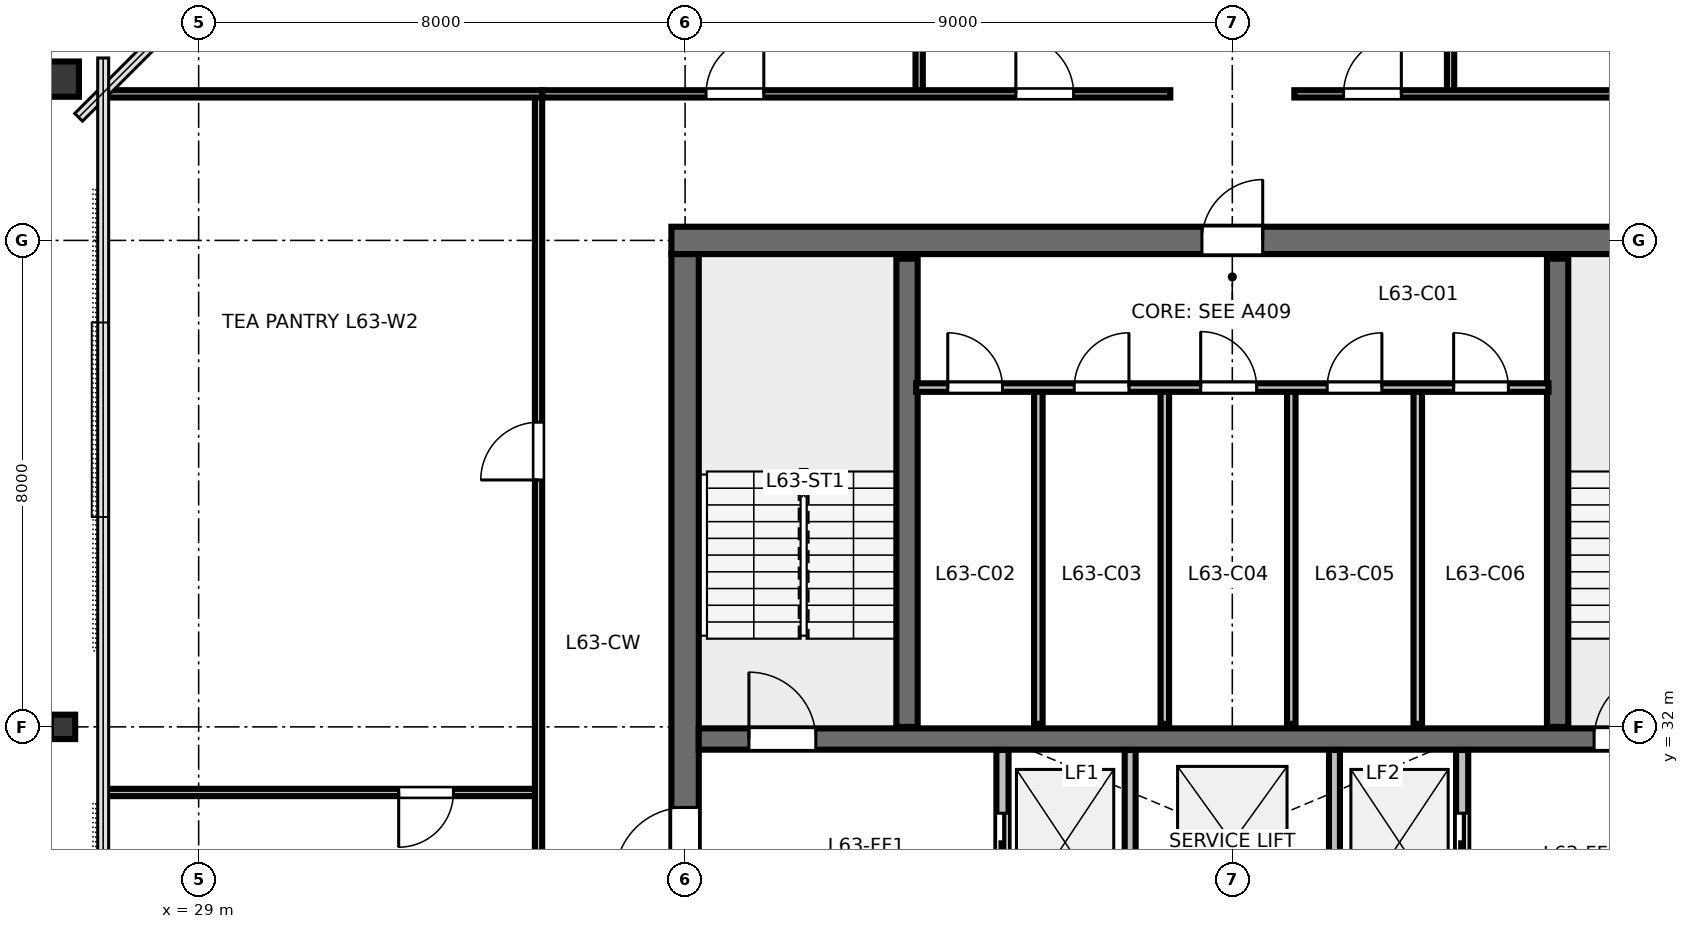
"""IFC4 building model, lengths in metres.
Left out: names, types, materials, properties, quantities, classifications, styles, units other than length and angle.
Written with IfcOpenShell. Run it as: python <this file> out.ifc"""

import sys

from ifc_helpers import new_model, si_unit, direction, frame, frame_2d, origin, origin_2d, place, context, subcontext, project, spatial, rectangle, hollow_rectangle, i_section, extrude, element, fill, save


model = new_model("IFC4")
c1 = context("Model", 3, precision=1e-05, world=origin(), true_north=direction((0.0, 1.0)))
c2 = subcontext(c1, "Body", "Model", "MODEL_VIEW")
j1 = project(units=[si_unit("LENGTHUNIT", "METRE"), si_unit("PLANEANGLEUNIT", "RADIAN")], contexts=[c1])
p1 = place(None, origin())
s1 = spatial("IfcSite", under=j1, at=p1, CompositionType="ELEMENT")
p2 = place(p1, origin())
s2 = spatial("IfcBuilding", under=s1, at=p2, CompositionType="ELEMENT")
p3 = place(p2, frame((0.0, 0.0, 239.4)))
s3 = spatial("IfcBuildingStorey", under=s2, at=p3, CompositionType="ELEMENT", Elevation=239.4)
p4 = place(p3, frame((36.775, 40.0, 0.0), z_axis=(0.0, 0.0, 1.0), x_axis=(1.0, 0.0, 0.0)))
e1 = element("IfcWall", 1, at=p4, inside=s3, PredefinedType="SHEAR", context=c2, shape_type="SweptSolid", body=[
    extrude(rectangle(XDim=18.45, YDim=0.45, at=frame_2d((9.225, 0.0))), origin(), (0.0, 0.0, 1.0), 3.36),
])
p5 = place(p4, frame((8.725, 0.0, 0.0)))
e2 = element("IfcOpeningElement", 2, at=p5, cuts=e1, PredefinedType="OPENING", context=c2, shape_type="SweptSolid", body=[
    extrude(rectangle(XDim=1.0, YDim=2.15, at=frame_2d((0.5, 1.075))), frame((0.0, 0.235, 0.0), z_axis=(0.0, -1.0, 0.0), x_axis=(1.0, 0.0, 0.0)), (0.0, 0.0, 1.0), 0.47),
])
p6 = place(p3, frame((37.0, 24.225, 0.0), z_axis=(0.0, 0.0, 1.0), x_axis=(0.0, 1.0, 0.0)))
e3 = element("IfcWall", 3, at=p6, inside=s3, PredefinedType="SHEAR", context=c2, shape_type="SweptSolid", body=[
    extrude(rectangle(XDim=15.55, YDim=0.45, at=frame_2d((7.775, 0.0))), origin(), (0.0, 0.0, 1.0), 3.36),
])
p7 = place(p6, frame((5.3, 0.0, 0.0)))
e4 = element("IfcOpeningElement", 4, at=p7, cuts=e3, PredefinedType="OPENING", context=c2, shape_type="SweptSolid", body=[
    extrude(rectangle(XDim=1.15, YDim=2.15, at=frame_2d((0.575, 1.075))), frame((0.0, 0.235, 0.0), z_axis=(0.0, -1.0, 0.0), x_axis=(1.0, 0.0, 0.0)), (0.0, 0.0, 1.0), 0.47),
])
p8 = place(p3, frame((37.225, 31.8, 0.0), z_axis=(0.0, 0.0, 1.0), x_axis=(1.0, 0.0, 0.0)))
e5 = element("IfcWall", 5, at=p8, inside=s3, PredefinedType="SHEAR", context=c2, shape_type="SweptSolid", body=[
    extrude(rectangle(XDim=17.55, YDim=0.35, at=frame_2d((8.775, 0.0))), origin(), (0.0, 0.0, 1.0), 3.36),
])
p9 = place(p8, frame((0.825, 0.0, 0.0)))
e6 = element("IfcOpeningElement", 6, at=p9, cuts=e5, PredefinedType="OPENING", context=c2, shape_type="SweptSolid", body=[
    extrude(rectangle(XDim=1.1, YDim=2.15, at=frame_2d((0.55, 1.075))), frame((0.0, 0.185, 0.0), z_axis=(0.0, -1.0, 0.0), x_axis=(1.0, 0.0, 0.0)), (0.0, 0.0, 1.0), 0.37),
])
p10 = place(p8, frame((14.725, 0.0, 0.0)))
e7 = element("IfcOpeningElement", 7, at=p10, cuts=e5, PredefinedType="OPENING", context=c2, shape_type="SweptSolid", body=[
    extrude(rectangle(XDim=1.1, YDim=2.15, at=frame_2d((0.55, 1.075))), frame((0.0, 0.185, 0.0), z_axis=(0.0, -1.0, 0.0), x_axis=(1.0, 0.0, 0.0)), (0.0, 0.0, 1.0), 0.37),
])
p11 = place(p3, frame((26.68, 42.652, 0.0), z_axis=(0.0, 0.0, 1.0), x_axis=(0.0, 1.0, 0.0)))
e8 = element("IfcColumn", 8, at=p11, inside=s3, PredefinedType="COLUMN", context=c2, shape_type="SweptSolid", body=[
    extrude(hollow_rectangle(XDim=0.58, YDim=0.7, WallThickness=0.032, at=origin_2d()), origin(), (0.0, 0.0, 1.0), 3.373),
])
p12 = place(p3, frame((26.77, 32.0, 0.0), z_axis=(0.0, 0.0, 1.0), x_axis=(0.0, 1.0, 0.0)))
e9 = element("IfcColumn", 9, at=p12, inside=s3, PredefinedType="COLUMN", context=c2, shape_type="SweptSolid", body=[
    extrude(i_section(OverallWidth=0.401, OverallDepth=0.399, WebThickness=0.025, FlangeThickness=0.04, FilletRadius=0.025, at=origin_2d()), origin(), (0.0, 0.0, 1.0), 3.373),
])
for number, where, z_axis, x_axis in (
    (10, (40.65, 32.0, 0.0), (0.0, 0.0, 1.0), (0.0, 1.0, 0.0)),
    (11, (51.35, 32.0, 0.0), (0.0, 0.0, 1.0), (0.0, 1.0, 0.0)),
):
    element("IfcWall", number, at=place(p3, frame(where, z_axis=z_axis, x_axis=x_axis)), inside=s3, PredefinedType="SHEAR", context=c2, shape_type="SweptSolid", body=[
        extrude(rectangle(XDim=7.7, YDim=0.35, at=frame_2d((3.85, 0.0))), origin(), (0.0, 0.0, 1.0), 3.6),
    ])
for number, where, z_axis, x_axis in (
    (12, (42.81, 32.05, 0.0), (0.0, 0.0, 1.0), (0.0, 1.0, 0.0)),
    (13, (44.89, 32.05, 0.0), (0.0, 0.0, 1.0), (0.0, 1.0, 0.0)),
    (14, (46.97, 32.05, 0.0), (0.0, 0.0, 1.0), (0.0, 1.0, 0.0)),
    (15, (49.05, 32.05, 0.0), (0.0, 0.0, 1.0), (0.0, 1.0, 0.0)),
):
    element("IfcWall", number, at=place(p3, frame(where, z_axis=z_axis, x_axis=x_axis)), inside=s3, PredefinedType="PARTITIONING", context=c2, shape_type="SweptSolid", body=[
        extrude(rectangle(XDim=5.5, YDim=0.14, at=frame_2d((2.75, 0.0))), origin(), (0.0, 0.0, 1.0), 3.375),
    ])
p13 = place(p3, frame((40.8, 37.58, 0.0), z_axis=(0.0, 0.0, 1.0), x_axis=(1.0, 0.0, 0.0)))
e16 = element("IfcWall", 16, at=p13, inside=s3, PredefinedType="PARTITIONING", context=c2, shape_type="SweptSolid", body=[
    extrude(rectangle(XDim=10.4, YDim=0.14, at=frame_2d((5.2, 0.0))), origin(), (0.0, 0.0, 1.0), 3.375),
])
p14 = place(p13, frame((0.52, 0.0, 0.0)))
e17 = element("IfcOpeningElement", 17, at=p14, cuts=e16, PredefinedType="OPENING", context=c2, shape_type="SweptSolid", body=[
    extrude(rectangle(XDim=0.9, YDim=2.15, at=frame_2d((0.45, 1.075))), frame((0.0, 0.08, 0.0), z_axis=(0.0, -1.0, 0.0), x_axis=(1.0, 0.0, 0.0)), (0.0, 0.0, 1.0), 0.16),
])
p15 = place(p13, frame((2.6, 0.0, 0.0)))
e18 = element("IfcOpeningElement", 18, at=p15, cuts=e16, PredefinedType="OPENING", context=c2, shape_type="SweptSolid", body=[
    extrude(rectangle(XDim=0.9, YDim=2.15, at=frame_2d((0.45, 1.075))), frame((0.0, 0.08, 0.0), z_axis=(0.0, -1.0, 0.0), x_axis=(1.0, 0.0, 0.0)), (0.0, 0.0, 1.0), 0.16),
])
p16 = place(p13, frame((4.68, 0.0, 0.0)))
e19 = element("IfcOpeningElement", 19, at=p16, cuts=e16, PredefinedType="OPENING", context=c2, shape_type="SweptSolid", body=[
    extrude(rectangle(XDim=0.92, YDim=2.15, at=frame_2d((0.46, 1.075))), frame((0.0, 0.08, 0.0), z_axis=(0.0, -1.0, 0.0), x_axis=(1.0, 0.0, 0.0)), (0.0, 0.0, 1.0), 0.16),
])
p17 = place(p13, frame((6.76, 0.0, 0.0)))
e20 = element("IfcOpeningElement", 20, at=p17, cuts=e16, PredefinedType="OPENING", context=c2, shape_type="SweptSolid", body=[
    extrude(rectangle(XDim=0.9, YDim=2.15, at=frame_2d((0.45, 1.075))), frame((0.0, 0.08, 0.0), z_axis=(0.0, -1.0, 0.0), x_axis=(1.0, 0.0, 0.0)), (0.0, 0.0, 1.0), 0.16),
])
p18 = place(p13, frame((8.84, 0.0, 0.0)))
e21 = element("IfcOpeningElement", 21, at=p18, cuts=e16, PredefinedType="OPENING", context=c2, shape_type="SweptSolid", body=[
    extrude(rectangle(XDim=0.9, YDim=2.15, at=frame_2d((0.45, 1.075))), frame((0.0, 0.08, 0.0), z_axis=(0.0, -1.0, 0.0), x_axis=(1.0, 0.0, 0.0)), (0.0, 0.0, 1.0), 0.16),
])
p19 = place(p3, frame((42.22, 28.58, 0.0), z_axis=(0.0, 0.0, 1.0), x_axis=(0.0, 1.0, 0.0)))
e22 = element("IfcWall", 22, at=p19, inside=s3, PredefinedType="PARTITIONING", context=c2, shape_type="SweptSolid", body=[
    extrude(rectangle(XDim=3.04, YDim=0.2, at=frame_2d((1.52, 0.0))), origin(), (0.0, 0.0, 1.0), 3.375),
])
p20 = place(p19, frame((0.95, 0.0, 0.0)))
e23 = element("IfcOpeningElement", 23, at=p20, cuts=e22, PredefinedType="OPENING", context=c2, shape_type="SweptSolid", body=[
    extrude(rectangle(XDim=1.05, YDim=2.15, at=frame_2d((0.525, 1.075))), frame((0.0, 0.11, 0.0), z_axis=(0.0, -1.0, 0.0), x_axis=(1.0, 0.0, 0.0)), (0.0, 0.0, 1.0), 0.22),
])
p21 = place(p3, frame((49.78, 28.58, 0.0), z_axis=(0.0, 0.0, 1.0), x_axis=(0.0, 1.0, 0.0)))
e24 = element("IfcWall", 24, at=p21, inside=s3, PredefinedType="PARTITIONING", context=c2, shape_type="SweptSolid", body=[
    extrude(rectangle(XDim=3.04, YDim=0.2, at=frame_2d((1.52, 0.0))), origin(), (0.0, 0.0, 1.0), 3.375),
])
p22 = place(p21, frame((0.95, 0.0, 0.0)))
e25 = element("IfcOpeningElement", 25, at=p22, cuts=e24, PredefinedType="OPENING", context=c2, shape_type="SweptSolid", body=[
    extrude(rectangle(XDim=1.05, YDim=2.15, at=frame_2d((0.525, 1.075))), frame((0.0, 0.11, 0.0), z_axis=(0.0, -1.0, 0.0), x_axis=(1.0, 0.0, 0.0)), (0.0, 0.0, 1.0), 0.22),
])
for number, where, z_axis, x_axis in (
    (26, (44.32, 28.58, 0.0), (0.0, 0.0, 1.0), (0.0, 1.0, 0.0)),
    (27, (47.68, 28.58, 0.0), (0.0, 0.0, 1.0), (0.0, 1.0, 0.0)),
):
    element("IfcWall", number, at=place(p3, frame(where, z_axis=z_axis, x_axis=x_axis)), inside=s3, PredefinedType="PARTITIONING", context=c2, shape_type="SweptSolid", body=[
        extrude(rectangle(XDim=3.04, YDim=0.18, at=frame_2d((1.52, 0.0))), origin(), (0.0, 0.0, 1.0), 3.375),
    ])
p23 = place(p3, frame((40.85, 42.41, 0.0), z_axis=(0.0, 0.0, 1.0), x_axis=(0.0, 1.0, 0.0)))
e28 = element("IfcWall", 28, at=p23, inside=s3, PredefinedType="PARTITIONING", context=c2, shape_type="SweptSolid", body=[
    extrude(rectangle(XDim=6.41, YDim=0.12, at=frame_2d((3.205, 0.0))), origin(), (0.0, 0.0, 1.0), 2.655),
])
p24 = place(p23, frame((1.4, 0.0, 0.0)))
e29 = element("IfcOpeningElement", 29, at=p24, cuts=e28, PredefinedType="OPENING", context=c2, shape_type="SweptSolid", body=[
    extrude(rectangle(XDim=0.9, YDim=2.15, at=frame_2d((0.45, 1.075))), frame((0.0, 0.07, 0.0), z_axis=(0.0, -1.0, 0.0), x_axis=(1.0, 0.0, 0.0)), (0.0, 0.0, 1.0), 0.14),
])
p25 = place(p3, frame((49.59, 42.41, 0.0), z_axis=(0.0, 0.0, 1.0), x_axis=(0.0, 1.0, 0.0)))
e30 = element("IfcWall", 30, at=p25, inside=s3, PredefinedType="PARTITIONING", context=c2, shape_type="SweptSolid", body=[
    extrude(rectangle(XDim=6.41, YDim=0.12, at=frame_2d((3.205, 0.0))), origin(), (0.0, 0.0, 1.0), 2.655),
])
p26 = place(p25, frame((1.4, 0.0, 0.0)))
e31 = element("IfcOpeningElement", 31, at=p26, cuts=e30, PredefinedType="OPENING", context=c2, shape_type="SweptSolid", body=[
    extrude(rectangle(XDim=0.9, YDim=2.15, at=frame_2d((0.45, 1.075))), frame((0.0, 0.07, 0.0), z_axis=(0.0, -1.0, 0.0), x_axis=(1.0, 0.0, 0.0)), (0.0, 0.0, 1.0), 0.14),
])
p27 = place(p3, frame((34.65, 42.41, 0.0), z_axis=(0.0, 0.0, 1.0), x_axis=(1.0, 0.0, 0.0)))
e32 = element("IfcWall", 32, at=p27, inside=s3, PredefinedType="PARTITIONING", context=c2, shape_type="SweptSolid", body=[
    extrude(rectangle(XDim=10.33, YDim=0.12, at=frame_2d((5.165, 0.0))), origin(), (0.0, 0.0, 1.0), 2.655),
])
p28 = place(p27, frame((2.695, 0.0, 0.0)))
e33 = element("IfcOpeningElement", 33, at=p28, cuts=e32, PredefinedType="OPENING", context=c2, shape_type="SweptSolid", body=[
    extrude(rectangle(XDim=0.95, YDim=2.15, at=frame_2d((0.475, 1.075))), frame((0.0, 0.07, 0.0), z_axis=(0.0, -1.0, 0.0), x_axis=(1.0, 0.0, 0.0)), (0.0, 0.0, 1.0), 0.14),
])
p29 = place(p27, frame((7.79, 0.0, 0.0)))
e34 = element("IfcOpeningElement", 34, at=p29, cuts=e32, PredefinedType="OPENING", context=c2, shape_type="SweptSolid", body=[
    extrude(rectangle(XDim=0.95, YDim=2.15, at=frame_2d((0.475, 1.075))), frame((0.0, 0.07, 0.0), z_axis=(0.0, -1.0, 0.0), x_axis=(1.0, 0.0, 0.0)), (0.0, 0.0, 1.0), 0.14),
])
p30 = place(p3, frame((47.02, 42.41, 0.0), z_axis=(0.0, 0.0, 1.0), x_axis=(1.0, 0.0, 0.0)))
e35 = element("IfcWall", 35, at=p30, inside=s3, PredefinedType="PARTITIONING", context=c2, shape_type="SweptSolid", body=[
    extrude(rectangle(XDim=10.33, YDim=0.12, at=frame_2d((5.165, 0.0))), origin(), (0.0, 0.0, 1.0), 2.655),
])
p31 = place(p30, frame((0.81, 0.0, 0.0)))
e36 = element("IfcOpeningElement", 36, at=p31, cuts=e35, PredefinedType="OPENING", context=c2, shape_type="SweptSolid", body=[
    extrude(rectangle(XDim=0.95, YDim=2.15, at=frame_2d((0.475, 1.075))), frame((0.0, 0.07, 0.0), z_axis=(0.0, -1.0, 0.0), x_axis=(1.0, 0.0, 0.0)), (0.0, 0.0, 1.0), 0.14),
])
p32 = place(p30, frame((5.905, 0.0, 0.0)))
e37 = element("IfcOpeningElement", 37, at=p32, cuts=e35, PredefinedType="OPENING", context=c2, shape_type="SweptSolid", body=[
    extrude(rectangle(XDim=0.95, YDim=2.15, at=frame_2d((0.475, 1.075))), frame((0.0, 0.07, 0.0), z_axis=(0.0, -1.0, 0.0), x_axis=(1.0, 0.0, 0.0)), (0.0, 0.0, 1.0), 0.14),
])
p33 = place(p3, frame((34.59, 30.921, 0.0), z_axis=(0.0, 0.0, 1.0), x_axis=(-1.0, 0.0, 0.0)))
e38 = element("IfcWall", 38, at=p33, inside=s3, PredefinedType="PARTITIONING", context=c2, shape_type="SweptSolid", body=[
    extrude(rectangle(XDim=7.16, YDim=0.12, at=frame_2d((3.58, 0.0))), origin(), (0.0, 0.0, 1.0), 2.655),
])
p34 = place(p33, frame((1.4, 0.0, 0.0)))
e39 = element("IfcOpeningElement", 39, at=p34, cuts=e38, PredefinedType="OPENING", context=c2, shape_type="SweptSolid", body=[
    extrude(rectangle(XDim=0.9, YDim=2.15, at=frame_2d((0.45, 1.075))), frame((0.0, 0.07, 0.0), z_axis=(0.0, -1.0, 0.0), x_axis=(1.0, 0.0, 0.0)), (0.0, 0.0, 1.0), 0.14),
])
p35 = place(p3, frame((34.59, 21.65, 0.0), z_axis=(0.0, 0.0, 1.0), x_axis=(0.0, 1.0, 0.0)))
e40 = element("IfcWall", 40, at=p35, inside=s3, PredefinedType="PARTITIONING", context=c2, shape_type="SweptSolid", body=[
    extrude(rectangle(XDim=20.7, YDim=0.12, at=frame_2d((10.35, 0.0))), origin(), (0.0, 0.0, 1.0), 2.655),
])
p36 = place(p35, frame((4.26, 0.0, 0.0)))
e41 = element("IfcOpeningElement", 41, at=p36, cuts=e40, PredefinedType="OPENING", context=c2, shape_type="SweptSolid", body=[
    extrude(rectangle(XDim=0.95, YDim=2.15, at=frame_2d((0.475, 1.075))), frame((0.0, 0.07, 0.0), z_axis=(0.0, -1.0, 0.0), x_axis=(1.0, 0.0, 0.0)), (0.0, 0.0, 1.0), 0.14),
])
p37 = place(p35, frame((14.411, 0.0, 0.0)))
e42 = element("IfcOpeningElement", 42, at=p37, cuts=e40, PredefinedType="OPENING", context=c2, shape_type="SweptSolid", body=[
    extrude(rectangle(XDim=0.95, YDim=2.15, at=frame_2d((0.475, 1.075))), frame((0.0, 0.07, 0.0), z_axis=(0.0, -1.0, 0.0), x_axis=(1.0, 0.0, 0.0)), (0.0, 0.0, 1.0), 0.14),
])
p38 = place(p3, frame((34.65, 42.41, 0.0), z_axis=(0.0, 0.0, 1.0), x_axis=(-1.0, 0.0, 0.0)))
e43 = element("IfcWall", 43, at=p38, inside=s3, PredefinedType="PARTITIONING", context=c2, shape_type="SweptSolid", body=[
    extrude(rectangle(XDim=7.22, YDim=0.12, at=frame_2d((3.61, 0.0))), origin(), (0.0, 0.0, 1.0), 2.655),
])
p39 = place(p9, origin())
e44 = element("IfcDoor", 44, at=p39, inside=s3, OperationType="SINGLE_SWING_LEFT", PredefinedType="DOOR", context=c2, shape_type="SweptSolid", body=[
    extrude(rectangle(XDim=1.1, YDim=2.15, at=frame_2d((0.55, 1.075))), frame((0.0, 0.025, 0.0), z_axis=(0.0, -1.0, 0.0), x_axis=(1.0, 0.0, 0.0)), (0.0, 0.0, 1.0), 0.05),
])
fill(e6, e44)
p40 = place(p10, origin())
e45 = element("IfcDoor", 45, at=p40, inside=s3, OperationType="SINGLE_SWING_RIGHT", PredefinedType="DOOR", context=c2, shape_type="SweptSolid", body=[
    extrude(rectangle(XDim=1.1, YDim=2.15, at=frame_2d((0.55, 1.075))), frame((0.0, 0.025, 0.0), z_axis=(0.0, -1.0, 0.0), x_axis=(1.0, 0.0, 0.0)), (0.0, 0.0, 1.0), 0.05),
])
fill(e7, e45)
p41 = place(p5, origin())
e46 = element("IfcDoor", 46, at=p41, inside=s3, OperationType="SINGLE_SWING_RIGHT", PredefinedType="DOOR", context=c2, shape_type="SweptSolid", body=[
    extrude(rectangle(XDim=1.0, YDim=2.15, at=frame_2d((0.5, 1.075))), frame((0.0, 0.025, 0.0), z_axis=(0.0, -1.0, 0.0), x_axis=(1.0, 0.0, 0.0)), (0.0, 0.0, 1.0), 0.05),
])
fill(e2, e46)
p42 = place(p7, origin())
e47 = element("IfcDoor", 47, at=p42, inside=s3, OperationType="SINGLE_SWING_LEFT", PredefinedType="DOOR", context=c2, shape_type="SweptSolid", body=[
    extrude(rectangle(XDim=1.15, YDim=2.15, at=frame_2d((0.575, 1.075))), frame((0.0, 0.025, 0.0), z_axis=(0.0, -1.0, 0.0), x_axis=(1.0, 0.0, 0.0)), (0.0, 0.0, 1.0), 0.05),
])
fill(e4, e47)
p43 = place(p14, origin())
e48 = element("IfcDoor", 48, at=p43, inside=s3, OperationType="SINGLE_SWING_LEFT", PredefinedType="DOOR", context=c2, shape_type="SweptSolid", body=[
    extrude(rectangle(XDim=0.9, YDim=2.15, at=frame_2d((0.45, 1.075))), frame((0.0, 0.025, 0.0), z_axis=(0.0, -1.0, 0.0), x_axis=(1.0, 0.0, 0.0)), (0.0, 0.0, 1.0), 0.05),
])
fill(e17, e48)
p44 = place(p15, origin())
e49 = element("IfcDoor", 49, at=p44, inside=s3, OperationType="SINGLE_SWING_RIGHT", PredefinedType="DOOR", context=c2, shape_type="SweptSolid", body=[
    extrude(rectangle(XDim=0.9, YDim=2.15, at=frame_2d((0.45, 1.075))), frame((0.0, 0.025, 0.0), z_axis=(0.0, -1.0, 0.0), x_axis=(1.0, 0.0, 0.0)), (0.0, 0.0, 1.0), 0.05),
])
fill(e18, e49)
p45 = place(p16, origin())
e50 = element("IfcDoor", 50, at=p45, inside=s3, OperationType="SINGLE_SWING_LEFT", PredefinedType="DOOR", context=c2, shape_type="SweptSolid", body=[
    extrude(rectangle(XDim=0.92, YDim=2.15, at=frame_2d((0.46, 1.075))), frame((0.0, 0.025, 0.0), z_axis=(0.0, -1.0, 0.0), x_axis=(1.0, 0.0, 0.0)), (0.0, 0.0, 1.0), 0.05),
])
fill(e19, e50)
p46 = place(p17, origin())
e51 = element("IfcDoor", 51, at=p46, inside=s3, OperationType="SINGLE_SWING_RIGHT", PredefinedType="DOOR", context=c2, shape_type="SweptSolid", body=[
    extrude(rectangle(XDim=0.9, YDim=2.15, at=frame_2d((0.45, 1.075))), frame((0.0, 0.025, 0.0), z_axis=(0.0, -1.0, 0.0), x_axis=(1.0, 0.0, 0.0)), (0.0, 0.0, 1.0), 0.05),
])
fill(e20, e51)
p47 = place(p18, origin())
e52 = element("IfcDoor", 52, at=p47, inside=s3, OperationType="SINGLE_SWING_LEFT", PredefinedType="DOOR", context=c2, shape_type="SweptSolid", body=[
    extrude(rectangle(XDim=0.9, YDim=2.15, at=frame_2d((0.45, 1.075))), frame((0.0, 0.025, 0.0), z_axis=(0.0, -1.0, 0.0), x_axis=(1.0, 0.0, 0.0)), (0.0, 0.0, 1.0), 0.05),
])
fill(e21, e52)
p48 = place(p20, origin())
e53 = element("IfcDoor", 53, at=p48, inside=s3, OperationType="SLIDING_TO_LEFT", PredefinedType="DOOR", context=c2, shape_type="SweptSolid", body=[
    extrude(rectangle(XDim=1.05, YDim=2.15, at=frame_2d((0.525, 1.075))), frame((0.0, 0.025, 0.0), z_axis=(0.0, -1.0, 0.0), x_axis=(1.0, 0.0, 0.0)), (0.0, 0.0, 1.0), 0.05),
])
fill(e23, e53)
p49 = place(p22, origin())
e54 = element("IfcDoor", 54, at=p49, inside=s3, OperationType="SLIDING_TO_RIGHT", PredefinedType="DOOR", context=c2, shape_type="SweptSolid", body=[
    extrude(rectangle(XDim=1.05, YDim=2.15, at=frame_2d((0.525, 1.075))), frame((0.0, 0.025, 0.0), z_axis=(0.0, -1.0, 0.0), x_axis=(1.0, 0.0, 0.0)), (0.0, 0.0, 1.0), 0.05),
])
fill(e25, e54)
p50 = place(p28, origin())
e55 = element("IfcDoor", 55, at=p50, inside=s3, OperationType="SINGLE_SWING_RIGHT", PredefinedType="DOOR", context=c2, shape_type="SweptSolid", body=[
    extrude(rectangle(XDim=0.95, YDim=2.15, at=frame_2d((0.475, 1.075))), frame((0.0, 0.025, 0.0), z_axis=(0.0, -1.0, 0.0), x_axis=(1.0, 0.0, 0.0)), (0.0, 0.0, 1.0), 0.05),
])
fill(e33, e55)
p51 = place(p29, origin())
e56 = element("IfcDoor", 56, at=p51, inside=s3, OperationType="SINGLE_SWING_LEFT", PredefinedType="DOOR", context=c2, shape_type="SweptSolid", body=[
    extrude(rectangle(XDim=0.95, YDim=2.15, at=frame_2d((0.475, 1.075))), frame((0.0, 0.025, 0.0), z_axis=(0.0, -1.0, 0.0), x_axis=(1.0, 0.0, 0.0)), (0.0, 0.0, 1.0), 0.05),
])
fill(e34, e56)
p52 = place(p31, origin())
e57 = element("IfcDoor", 57, at=p52, inside=s3, OperationType="SINGLE_SWING_RIGHT", PredefinedType="DOOR", context=c2, shape_type="SweptSolid", body=[
    extrude(rectangle(XDim=0.95, YDim=2.15, at=frame_2d((0.475, 1.075))), frame((0.0, 0.025, 0.0), z_axis=(0.0, -1.0, 0.0), x_axis=(1.0, 0.0, 0.0)), (0.0, 0.0, 1.0), 0.05),
])
fill(e36, e57)
p53 = place(p34, origin())
e58 = element("IfcDoor", 58, at=p53, inside=s3, OperationType="SINGLE_SWING_RIGHT", PredefinedType="DOOR", context=c2, shape_type="SweptSolid", body=[
    extrude(rectangle(XDim=0.9, YDim=2.15, at=frame_2d((0.45, 1.075))), frame((0.0, 0.025, 0.0), z_axis=(0.0, -1.0, 0.0), x_axis=(1.0, 0.0, 0.0)), (0.0, 0.0, 1.0), 0.05),
])
fill(e39, e58)
p54 = place(p37, origin())
e59 = element("IfcDoor", 59, at=p54, inside=s3, OperationType="SINGLE_SWING_LEFT", PredefinedType="DOOR", context=c2, shape_type="SweptSolid", body=[
    extrude(rectangle(XDim=0.95, YDim=2.15, at=frame_2d((0.475, 1.075))), frame((0.0, 0.025, 0.0), z_axis=(0.0, -1.0, 0.0), x_axis=(1.0, 0.0, 0.0)), (0.0, 0.0, 1.0), 0.05),
])
fill(e42, e59)
save(model, sys.argv[1])
